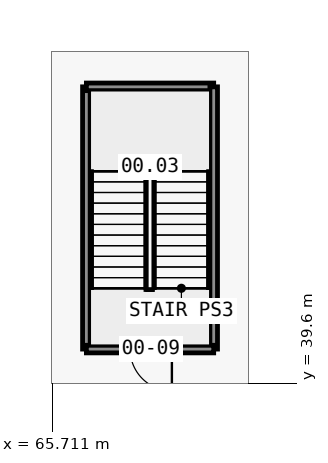
"""IFC4 building model, lengths in metres.
Left out: names, types, materials, properties, quantities, classifications, styles, units other than length and angle.
Written with IfcOpenShell. Run it as: python <this file> out.ifc"""

import sys

from ifc_helpers import new_model, si_unit, direction, frame, frame_2d, origin, place, context, subcontext, project, spatial, rectangle, extrude, element, fill, save


model = new_model("IFC4")
c1 = context("Model", 3, precision=1e-05, world=origin(), true_north=direction((0.0, 1.0)))
c2 = subcontext(c1, "Body", "Model", "MODEL_VIEW")
j1 = project(units=[si_unit("LENGTHUNIT", "METRE"), si_unit("PLANEANGLEUNIT", "RADIAN")], contexts=[c1])
p1 = place(None, origin())
s1 = spatial("IfcSite", under=j1, at=p1, CompositionType="ELEMENT")
p2 = place(p1, origin())
s2 = spatial("IfcBuilding", under=s1, at=p2, CompositionType="ELEMENT")
p3 = place(p2, origin())
s3 = spatial("IfcBuildingStorey", under=s2, at=p3, CompositionType="ELEMENT", Elevation=0.0)
p4 = place(p3, frame((66.6, 40.5, 0.0), z_axis=(0.0, 0.0, 1.0), x_axis=(0.0, 1.0, 0.0)))
e1 = element("IfcWall", 1, at=p4, inside=s3, PredefinedType="PARTITIONING", context=c2, shape_type="SweptSolid", body=[
    extrude(rectangle(XDim=6.9, YDim=0.2, at=frame_2d((3.45, 0.0))), origin(), (0.0, 0.0, 1.0), 7.65),
])
p5 = place(p3, frame((66.6, 47.4, 0.0), z_axis=(0.0, 0.0, 1.0), x_axis=(1.0, 0.0, 0.0)))
e2 = element("IfcWall", 2, at=p5, inside=s3, PredefinedType="PARTITIONING", context=c2, shape_type="SweptSolid", body=[
    extrude(rectangle(XDim=3.35, YDim=0.2, at=frame_2d((1.675, 0.0))), origin(), (0.0, 0.0, 1.0), 7.65),
])
p6 = place(p3, frame((69.95, 47.4, 0.0), z_axis=(0.0, 0.0, 1.0), x_axis=(0.0, -1.0, 0.0)))
e3 = element("IfcWall", 3, at=p6, inside=s3, PredefinedType="PARTITIONING", context=c2, shape_type="SweptSolid", body=[
    extrude(rectangle(XDim=6.9, YDim=0.2, at=frame_2d((3.45, 0.0))), origin(), (0.0, 0.0, 1.0), 7.65),
])
p7 = place(p3, frame((69.95, 40.5, 0.0), z_axis=(0.0, 0.0, 1.0), x_axis=(-1.0, 0.0, 0.0)))
e4 = element("IfcWall", 4, at=p7, inside=s3, PredefinedType="PARTITIONING", context=c2, shape_type="SweptSolid", body=[
    extrude(rectangle(XDim=3.35, YDim=0.2, at=frame_2d((1.675, 0.0))), origin(), (0.0, 0.0, 1.0), 7.65),
])
p8 = place(p7, frame((1.1, 0.0, 0.0)))
e5 = element("IfcOpeningElement", 5, at=p8, cuts=e4, PredefinedType="OPENING", context=c2, shape_type="SweptSolid", body=[
    extrude(rectangle(XDim=1.1, YDim=2.1, at=frame_2d((0.55, 1.05))), frame((0.0, 0.11, 0.0), z_axis=(0.0, -1.0, 0.0), x_axis=(1.0, 0.0, 0.0)), (0.0, 0.0, 1.0), 0.22),
])
p9 = place(p8, origin())
e6 = element("IfcDoor", 6, at=p9, inside=s3, OperationType="SINGLE_SWING_LEFT", PredefinedType="DOOR", context=c2, shape_type="SweptSolid", body=[
    extrude(rectangle(XDim=1.1, YDim=2.1, at=frame_2d((0.55, 1.05))), frame((0.0, 0.025, 0.0), z_axis=(0.0, -1.0, 0.0), x_axis=(1.0, 0.0, 0.0)), (0.0, 0.0, 1.0), 0.05),
])
fill(e5, e6)
save(model, sys.argv[1])
